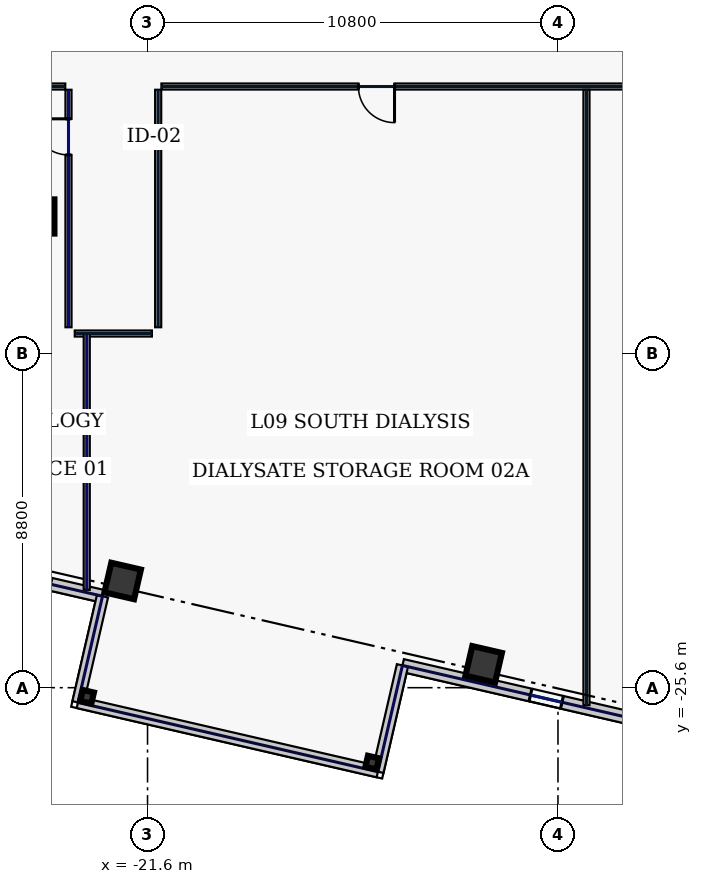
"""IFC4 building model, lengths in metres.
Left out: names, types, materials, properties, quantities, classifications, styles, units other than length and angle.
Written with IfcOpenShell. Run it as: python <this file> out.ifc"""

import sys

from ifc_helpers import new_model, si_unit, direction, frame, frame_2d, origin, origin_2d, place, context, subcontext, project, spatial, rectangle, hollow_rectangle, extrude, element, fill, save


model = new_model("IFC4")
c1 = context("Model", 3, precision=1e-05, world=origin(), true_north=direction((0.0, 1.0)))
c2 = subcontext(c1, "Body", "Model", "MODEL_VIEW")
j1 = project(units=[si_unit("LENGTHUNIT", "METRE"), si_unit("PLANEANGLEUNIT", "RADIAN")], contexts=[c1])
p1 = place(None, origin())
s1 = spatial("IfcSite", under=j1, at=p1, CompositionType="ELEMENT")
p2 = place(p1, origin())
s2 = spatial("IfcBuilding", under=s1, at=p2, CompositionType="ELEMENT")
p3 = place(p2, frame((0.0, 0.0, 47.4)))
s3 = spatial("IfcBuildingStorey", under=s2, at=p3, CompositionType="ELEMENT", Elevation=47.4)
p4 = place(p3, frame((-24.5, -13.2, 0.0), z_axis=(0.0, 0.0, 1.0), x_axis=(1.0, 0.0, 0.0)))
e1 = element("IfcColumn", 1, at=p4, inside=s3, PredefinedType="COLUMN", context=c2, shape_type="SweptSolid", body=[
    extrude(hollow_rectangle(XDim=0.9, YDim=0.9, WallThickness=0.04, at=origin_2d()), origin(), (0.0, 0.0, 1.0), 3.74),
])
for number, where, z_axis, x_axis in (
    (2, (-22.254, -22.792, 0.0), (0.0, 0.0, 1.0), (0.974, -0.225, 0.0)),
    (3, (-12.755, -24.985, 0.0), (0.0, 0.0, 1.0), (0.974, -0.225, 0.0)),
):
    element("IfcColumn", number, at=place(p3, frame(where, z_axis=z_axis, x_axis=x_axis)), inside=s3, PredefinedType="COLUMN", context=c2, shape_type="SweptSolid", body=[
        extrude(hollow_rectangle(XDim=0.8, YDim=0.8, WallThickness=0.036, at=origin_2d()), origin(), (0.0, 0.0, 1.0), 3.74),
    ])
for number, where, z_axis, x_axis in (
    (4, (-23.19, -25.839, 0.0), (0.0, 0.0, 1.0), (0.974, -0.225, 0.0)),
    (5, (-15.688, -27.571, 0.0), (0.0, 0.0, 1.0), (0.974, -0.225, 0.0)),
):
    element("IfcColumn", number, at=place(p3, frame(where, z_axis=z_axis, x_axis=x_axis)), inside=s3, PredefinedType="COLUMN", context=c2, shape_type="SweptSolid", body=[
        extrude(hollow_rectangle(XDim=0.3, YDim=0.3, WallThickness=0.016, at=origin_2d()), origin(), (0.0, 0.0, 1.0), 3.74),
    ])
p5 = place(p3, frame((-42.029, -18.75, 0.0), z_axis=(0.0, 0.0, 1.0), x_axis=(0.974371399361, -0.224945273581, 0.0)))
e6 = element("IfcWall", 6, at=p5, inside=s3, PredefinedType="STANDARD", context=c2, shape_type="SweptSolid", body=[
    extrude(rectangle(XDim=19.75, YDim=0.34, at=frame_2d((9.875, 0.0))), origin(), (0.0, 0.0, 1.0), 3.74),
])
p6 = place(p5, frame((2.062, 0.0, 0.72)))
e7 = element("IfcOpeningElement", 7, at=p6, cuts=e6, PredefinedType="OPENING", context=c2, shape_type="SweptSolid", body=[
    extrude(rectangle(XDim=2.5, YDim=2.15, at=frame_2d((1.25, 1.075))), frame((0.0, 0.18, 0.0), z_axis=(0.0, -1.0, 0.0), x_axis=(1.0, 0.0, 0.0)), (0.0, 0.0, 1.0), 0.36),
])
p7 = place(p5, frame((6.546, 0.0, 0.72)))
e8 = element("IfcOpeningElement", 8, at=p7, cuts=e6, PredefinedType="OPENING", context=c2, shape_type="SweptSolid", body=[
    extrude(rectangle(XDim=2.5, YDim=2.15, at=frame_2d((1.25, 1.075))), frame((0.0, 0.18, 0.0), z_axis=(0.0, -1.0, 0.0), x_axis=(1.0, 0.0, 0.0)), (0.0, 0.0, 1.0), 0.36),
])
p8 = place(p5, frame((13.461, 0.0, 0.72)))
e9 = element("IfcOpeningElement", 9, at=p8, cuts=e6, PredefinedType="OPENING", context=c2, shape_type="SweptSolid", body=[
    extrude(rectangle(XDim=0.85, YDim=1.85, at=frame_2d((0.425, 0.925))), frame((0.0, 0.18, 0.0), z_axis=(0.0, -1.0, 0.0), x_axis=(1.0, 0.0, 0.0)), (0.0, 0.0, 1.0), 0.36),
])
p9 = place(p5, frame((16.745, 0.0, 0.22)))
e10 = element("IfcOpeningElement", 10, at=p9, cuts=e6, PredefinedType="OPENING", context=c2, shape_type="SweptSolid", body=[
    extrude(rectangle(XDim=1.6, YDim=1.2, at=frame_2d((0.8, 0.6))), frame((0.0, 0.18, 0.0), z_axis=(0.0, -1.0, 0.0), x_axis=(1.0, 0.0, 0.0)), (0.0, 0.0, 1.0), 0.36),
])
p10 = place(p3, frame((-14.892, -25.015, 0.0), z_axis=(0.0, 0.0, 1.0), x_axis=(0.974372775, -0.224939314791, 0.0)))
e11 = element("IfcWall", 11, at=p10, inside=s3, PredefinedType="STANDARD", context=c2, shape_type="SweptSolid", body=[
    extrude(rectangle(XDim=14.299, YDim=0.34, at=frame_2d((7.149, 0.0))), origin(), (0.0, 0.0, 1.0), 3.74),
])
p11 = place(p10, frame((3.458, 0.0, 0.72)))
e12 = element("IfcOpeningElement", 12, at=p11, cuts=e11, PredefinedType="OPENING", context=c2, shape_type="SweptSolid", body=[
    extrude(rectangle(XDim=0.85, YDim=1.85, at=frame_2d((0.425, 0.925))), frame((0.0, 0.18, 0.0), z_axis=(0.0, -1.0, 0.0), x_axis=(1.0, 0.0, 0.0)), (0.0, 0.0, 1.0), 0.36),
])
p12 = place(p10, frame((7.942, 0.0, 0.72)))
e13 = element("IfcOpeningElement", 13, at=p12, cuts=e11, PredefinedType="OPENING", context=c2, shape_type="SweptSolid", body=[
    extrude(rectangle(XDim=2.5, YDim=2.15, at=frame_2d((1.25, 1.075))), frame((0.0, 0.18, 0.0), z_axis=(0.0, -1.0, 0.0), x_axis=(1.0, 0.0, 0.0)), (0.0, 0.0, 1.0), 0.36),
])
p13 = place(p3, frame((-22.785, -23.193, 0.0), z_axis=(0.0, 0.0, 1.0), x_axis=(-0.224983749842, -0.974362515857, 0.0)))
e14 = element("IfcWall", 14, at=p13, inside=s3, PredefinedType="STANDARD", context=c2, shape_type="SweptSolid", body=[
    extrude(rectangle(XDim=2.87, YDim=0.3, at=frame_2d((1.435, 0.0))), origin(), (0.0, 0.0, 1.0), 1.535),
])
p14 = place(p3, frame((-14.892, -25.015, 0.0), z_axis=(0.0, 0.0, 1.0), x_axis=(-0.225002397841, -0.97435820978, 0.0)))
e15 = element("IfcWall", 15, at=p14, inside=s3, PredefinedType="STANDARD", context=c2, shape_type="SweptSolid", body=[
    extrude(rectangle(XDim=2.87, YDim=0.3, at=frame_2d((1.435, 0.0))), origin(), (0.0, 0.0, 1.0), 1.535),
])
p15 = place(p3, frame((-23.43, -25.989, 0.0), z_axis=(0.0, 0.0, 1.0), x_axis=(0.974371888243, -0.224943155936, 0.0)))
e16 = element("IfcWall", 16, at=p15, inside=s3, PredefinedType="STANDARD", context=c2, shape_type="SweptSolid", body=[
    extrude(rectangle(XDim=8.1, YDim=0.3, at=frame_2d((4.05, 0.0))), origin(), (0.0, 0.0, 1.0), 2.135),
])
p16 = place(p3, frame((-23.765, -9.78, 0.0), z_axis=(0.0, 0.0, 1.0), x_axis=(-1.0, 0.0, 0.0)))
e17 = element("IfcWall", 17, at=p16, inside=s3, PredefinedType="PARTITIONING", context=c2, shape_type="SweptSolid", body=[
    extrude(rectangle(XDim=5.65, YDim=0.16, at=frame_2d((2.825, 0.0))), origin(), (0.0, 0.0, 1.0), 3.74),
])
p17 = place(p3, frame((29.415, -9.78, 0.0), z_axis=(0.0, 0.0, 1.0), x_axis=(-1.0, 0.0, 0.0)))
e18 = element("IfcWall", 18, at=p17, inside=s3, PredefinedType="PARTITIONING", context=c2, shape_type="SweptSolid", body=[
    extrude(rectangle(XDim=50.65, YDim=0.16, at=frame_2d((25.325, 0.0))), origin(), (0.0, 0.0, 1.0), 3.74),
])
p18 = place(p17, frame((44.516, 0.0, 0.0)))
e19 = element("IfcOpeningElement", 19, at=p18, cuts=e18, PredefinedType="OPENING", context=c2, shape_type="SweptSolid", body=[
    extrude(rectangle(XDim=0.95, YDim=2.2, at=frame_2d((0.475, 1.1))), frame((0.0, 0.09, 0.0), z_axis=(0.0, -1.0, 0.0), x_axis=(1.0, 0.0, 0.0)), (0.0, 0.0, 1.0), 0.18),
])
p19 = place(p17, frame((32.95, 0.0, 0.0)))
e20 = element("IfcOpeningElement", 20, at=p19, cuts=e18, PredefinedType="OPENING", context=c2, shape_type="SweptSolid", body=[
    extrude(rectangle(XDim=0.95, YDim=2.2, at=frame_2d((0.475, 1.1))), frame((0.0, 0.09, 0.0), z_axis=(0.0, -1.0, 0.0), x_axis=(1.0, 0.0, 0.0)), (0.0, 0.0, 1.0), 0.18),
])
p20 = place(p17, frame((21.36, 0.0, 0.0)))
e21 = element("IfcOpeningElement", 21, at=p20, cuts=e18, PredefinedType="OPENING", context=c2, shape_type="SweptSolid", body=[
    extrude(rectangle(XDim=0.95, YDim=2.2, at=frame_2d((0.475, 1.1))), frame((0.0, 0.09, 0.0), z_axis=(0.0, -1.0, 0.0), x_axis=(1.0, 0.0, 0.0)), (0.0, 0.0, 1.0), 0.18),
])
p21 = place(p17, frame((11.56, 0.0, 0.0)))
e22 = element("IfcOpeningElement", 22, at=p21, cuts=e18, PredefinedType="OPENING", context=c2, shape_type="SweptSolid", body=[
    extrude(rectangle(XDim=1.05, YDim=2.2, at=frame_2d((0.525, 1.1))), frame((0.0, 0.09, 0.0), z_axis=(0.0, -1.0, 0.0), x_axis=(1.0, 0.0, 0.0)), (0.0, 0.0, 1.0), 0.18),
])
p22 = place(p17, frame((5.075, 0.0, 0.0)))
e23 = element("IfcOpeningElement", 23, at=p22, cuts=e18, PredefinedType="OPENING", context=c2, shape_type="SweptSolid", body=[
    extrude(rectangle(XDim=0.95, YDim=2.2, at=frame_2d((0.475, 1.1))), frame((0.0, 0.09, 0.0), z_axis=(0.0, -1.0, 0.0), x_axis=(1.0, 0.0, 0.0)), (0.0, 0.0, 1.0), 0.18),
])
p23 = place(p17, frame((1.419, 0.0, 0.0)))
e24 = element("IfcOpeningElement", 24, at=p23, cuts=e18, PredefinedType="OPENING", context=c2, shape_type="SweptSolid", body=[
    extrude(rectangle(XDim=0.95, YDim=2.2, at=frame_2d((0.475, 1.1))), frame((0.0, 0.09, 0.0), z_axis=(0.0, -1.0, 0.0), x_axis=(1.0, 0.0, 0.0)), (0.0, 0.0, 1.0), 0.18),
])
p24 = place(p3, frame((-21.32, -9.865, 0.0), z_axis=(0.0, 0.0, 1.0), x_axis=(0.0, -1.0, 0.0)))
e25 = element("IfcWall", 25, at=p24, inside=s3, PredefinedType="PARTITIONING", context=c2, shape_type="SweptSolid", body=[
    extrude(rectangle(XDim=6.25, YDim=0.16, at=frame_2d((3.125, 0.0))), origin(), (0.0, 0.0, 1.0), 3.74),
])
p25 = place(p3, frame((-21.485, -16.28, 0.0), z_axis=(0.0, 0.0, 1.0), x_axis=(-1.0, 0.0, 0.0)))
e26 = element("IfcWall", 26, at=p25, inside=s3, PredefinedType="PARTITIONING", context=c2, shape_type="SweptSolid", body=[
    extrude(rectangle(XDim=2.03, YDim=0.16, at=frame_2d((1.015, 0.0))), origin(), (0.0, 0.0, 1.0), 3.74),
])
p26 = place(p3, frame((-23.68, -16.115, 0.0), z_axis=(0.0, 0.0, 1.0), x_axis=(0.0, 1.0, 0.0)))
e27 = element("IfcWall", 27, at=p26, inside=s3, PredefinedType="PARTITIONING", context=c2, shape_type="SweptSolid", body=[
    extrude(rectangle(XDim=6.25, YDim=0.16, at=frame_2d((3.125, 0.0))), origin(), (0.0, 0.0, 1.0), 3.235),
])
p27 = place(p26, frame((4.535, 0.0, 0.0)))
e28 = element("IfcOpeningElement", 28, at=p27, cuts=e27, PredefinedType="OPENING", context=c2, shape_type="SweptSolid", body=[
    extrude(rectangle(XDim=0.95, YDim=2.2, at=frame_2d((0.475, 1.1))), frame((0.0, 0.09, 0.0), z_axis=(0.0, -1.0, 0.0), x_axis=(1.0, 0.0, 0.0)), (0.0, 0.0, 1.0), 0.18),
])
p28 = place(p3, frame((-23.2, -23.025, 0.0), z_axis=(0.0, 0.0, 1.0), x_axis=(0.0, 1.0, 0.0)))
e29 = element("IfcWall", 29, at=p28, inside=s3, PredefinedType="PARTITIONING", context=c2, shape_type="SweptSolid", body=[
    extrude(rectangle(XDim=6.74, YDim=0.16, at=frame_2d((3.37, 0.0))), origin(), (0.0, 0.0, 1.0), 1.535),
])
p29 = place(p3, frame((-10.05, -26.061, 0.0), z_axis=(0.0, 0.0, 1.0), x_axis=(0.0, 1.0, 0.0)))
e30 = element("IfcWall", 30, at=p29, inside=s3, PredefinedType="PARTITIONING", context=c2, shape_type="SweptSolid", body=[
    extrude(rectangle(XDim=16.196, YDim=0.16, at=frame_2d((8.098, 0.0))), origin(), (0.0, 0.0, 1.0), 3.74),
])
p30 = place(p11, origin())
e31 = element("IfcWindow", 31, at=p30, inside=s3, PartitioningType="SINGLE_PANEL", PredefinedType="WINDOW", context=c2, shape_type="SweptSolid", body=[
    extrude(rectangle(XDim=0.85, YDim=1.85, at=frame_2d((0.425, 0.925))), frame((0.0, 0.03, 0.0), z_axis=(0.0, -1.0, 0.0), x_axis=(1.0, 0.0, 0.0)), (0.0, 0.0, 1.0), 0.06),
])
fill(e12, e31)
p31 = place(p27, origin())
e32 = element("IfcDoor", 32, at=p31, inside=s3, OperationType="SINGLE_SWING_RIGHT", PredefinedType="DOOR", context=c2, shape_type="SweptSolid", body=[
    extrude(rectangle(XDim=0.95, YDim=2.2, at=frame_2d((0.475, 1.1))), frame((0.0, 0.025, 0.0), z_axis=(0.0, -1.0, 0.0), x_axis=(1.0, 0.0, 0.0)), (0.0, 0.0, 1.0), 0.05),
])
fill(e28, e32)
p32 = place(p18, origin())
e33 = element("IfcDoor", 33, at=p32, inside=s3, OperationType="SINGLE_SWING_LEFT", PredefinedType="DOOR", context=c2, shape_type="SweptSolid", body=[
    extrude(rectangle(XDim=0.95, YDim=2.2, at=frame_2d((0.475, 1.1))), frame((0.0, 0.025, 0.0), z_axis=(0.0, -1.0, 0.0), x_axis=(1.0, 0.0, 0.0)), (0.0, 0.0, 1.0), 0.05),
])
fill(e19, e33)
save(model, sys.argv[1])
